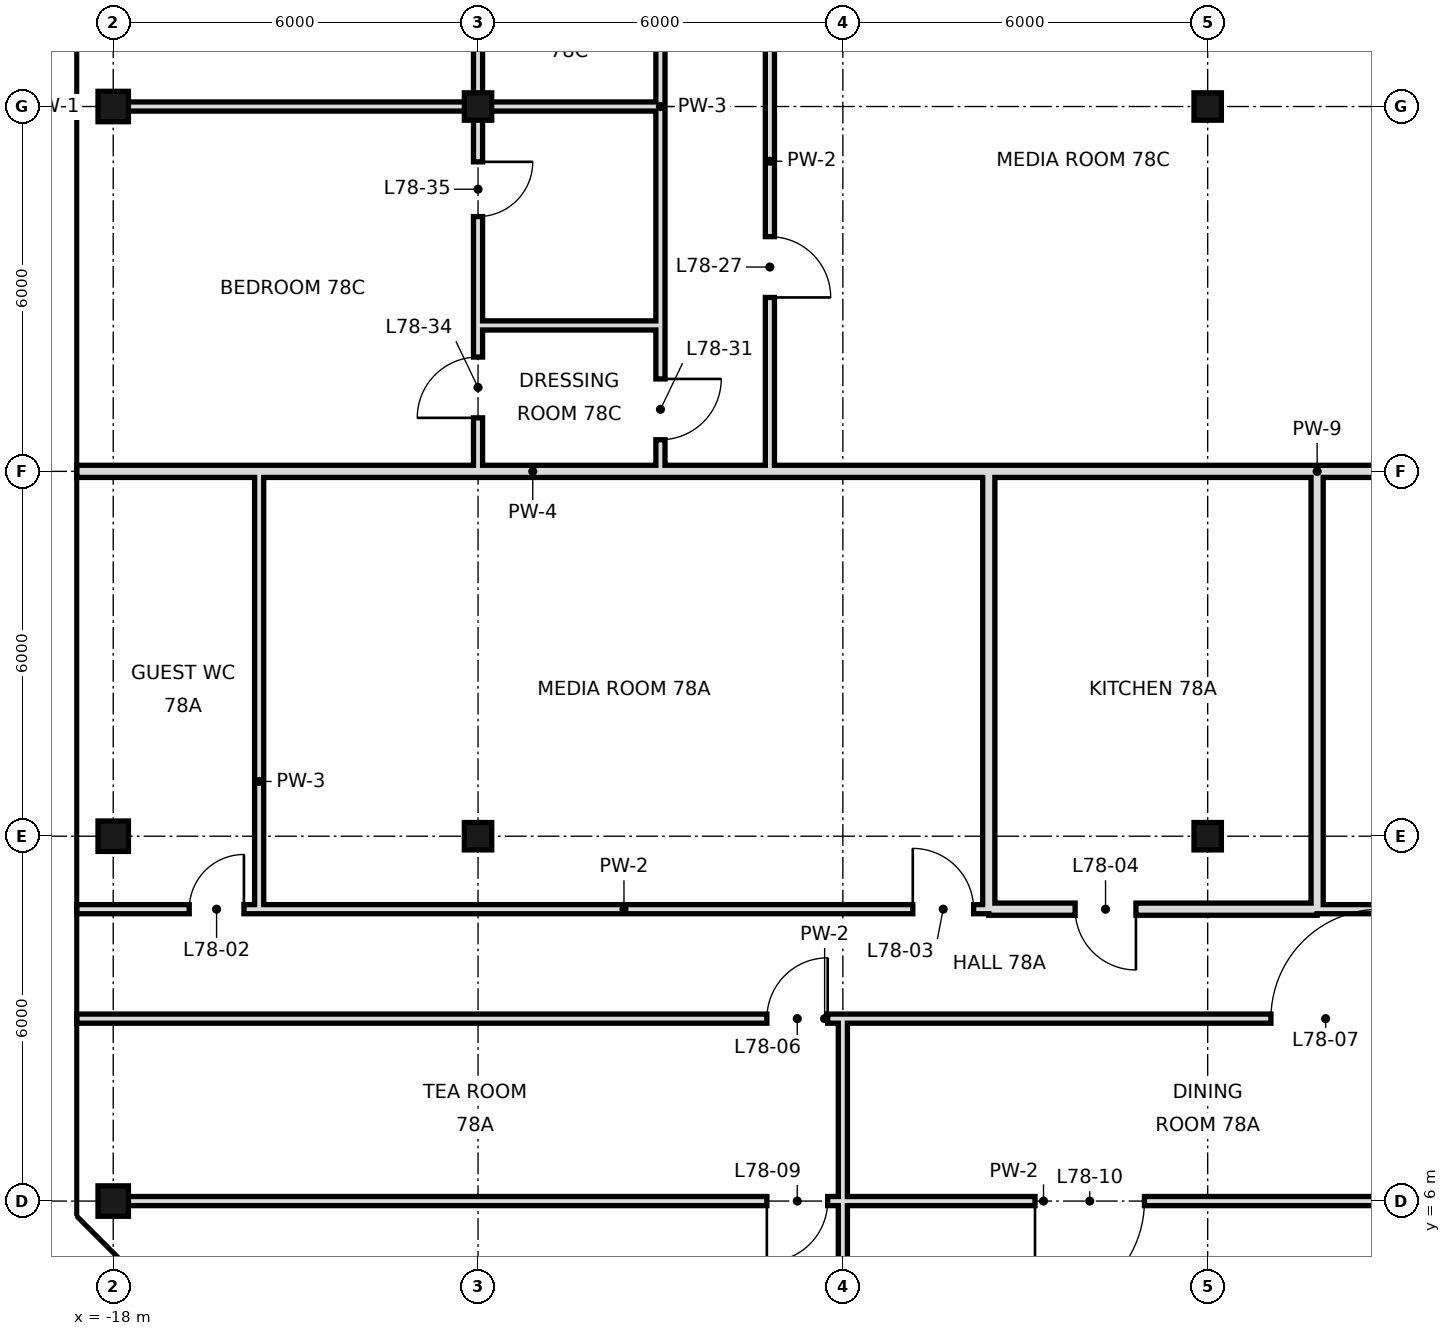
"""IFC4 building model, lengths in metres.
Left out: names, types, materials, properties, quantities, classifications, styles, units other than length and angle.
Written with IfcOpenShell. Run it as: python <this file> out.ifc"""

import sys

from ifc_helpers import new_model, si_unit, direction, frame, frame_2d, origin, origin_2d, place, context, subcontext, project, spatial, rectangle, hollow_rectangle, extrude, element, fill, save


model = new_model("IFC4")
c1 = context("Model", 3, precision=1e-05, world=origin(), true_north=direction((0.0, 1.0)))
c2 = subcontext(c1, "Body", "Model", "MODEL_VIEW")
j1 = project(units=[si_unit("LENGTHUNIT", "METRE"), si_unit("PLANEANGLEUNIT", "RADIAN")], contexts=[c1])
p1 = place(None, origin())
s1 = spatial("IfcSite", under=j1, at=p1, CompositionType="ELEMENT")
p2 = place(p1, origin())
s2 = spatial("IfcBuilding", under=s1, at=p2, CompositionType="ELEMENT")
p3 = place(p2, frame((0.0, 0.0, 326.8)))
s3 = spatial("IfcBuildingStorey", under=s2, at=p3, CompositionType="ELEMENT", Elevation=326.8)
for number, where, z_axis, x_axis in (
    (1, (-18.0, 6.0, 0.0), (0.0, 0.0, 1.0), (1.0, 0.0, 0.0)),
    (2, (-18.0, 12.0, 0.0), (0.0, 0.0, 1.0), (1.0, 0.0, 0.0)),
    (3, (-18.0, 24.0, 0.0), (0.0, 0.0, 1.0), (1.0, 0.0, 0.0)),
):
    element("IfcColumn", number, at=place(p3, frame(where, z_axis=z_axis, x_axis=x_axis)), inside=s3, PredefinedType="COLUMN", context=c2, shape_type="SweptSolid", body=[
        extrude(hollow_rectangle(XDim=0.5, YDim=0.5, WallThickness=0.025, at=origin_2d()), origin(), (0.0, 0.0, 1.0), 4.4),
    ])
for number, where, z_axis, x_axis in (
    (4, (-12.0, 12.0, 0.0), (0.0, 0.0, 1.0), (1.0, 0.0, 0.0)),
    (5, (-12.0, 24.0, 0.0), (0.0, 0.0, 1.0), (1.0, 0.0, 0.0)),
    (6, (0.0, 12.0, 0.0), (0.0, 0.0, 1.0), (1.0, 0.0, 0.0)),
    (7, (0.0, 24.0, 0.0), (0.0, 0.0, 1.0), (1.0, 0.0, 0.0)),
):
    element("IfcColumn", number, at=place(p3, frame(where, z_axis=z_axis, x_axis=x_axis)), inside=s3, PredefinedType="COLUMN", context=c2, shape_type="SweptSolid", body=[
        extrude(hollow_rectangle(XDim=0.45, YDim=0.45, WallThickness=0.022, at=origin_2d()), origin(), (0.0, 0.0, 1.0), 4.4),
    ])
p4 = place(p3, frame((-12.0, 18.0, 0.0), z_axis=(0.0, 0.0, 1.0), x_axis=(0.0, 1.0, 0.0)))
e8 = element("IfcWall", 8, at=p4, inside=s3, PredefinedType="PARTITIONING", context=c2, shape_type="SweptSolid", body=[
    extrude(rectangle(XDim=2.4, YDim=0.15, at=frame_2d((1.2, 0.0))), origin(), (0.0, 0.0, 1.0), 3.4),
])
p5 = place(p4, frame((0.88, 0.0, 0.0)))
e9 = element("IfcOpeningElement", 9, at=p5, cuts=e8, PredefinedType="OPENING", context=c2, shape_type="SweptSolid", body=[
    extrude(rectangle(XDim=1.0, YDim=2.4, at=frame_2d((0.5, 1.2))), frame((0.0, 0.085, 0.0), z_axis=(0.0, -1.0, 0.0), x_axis=(1.0, 0.0, 0.0)), (0.0, 0.0, 1.0), 0.17),
])
p6 = place(p3, frame((-12.0, 24.0, 0.0), z_axis=(0.0, 0.0, 1.0), x_axis=(0.0, 1.0, 0.0)))
e10 = element("IfcWall", 10, at=p6, inside=s3, PredefinedType="PARTITIONING", context=c2, shape_type="SweptSolid", body=[
    extrude(rectangle(XDim=24.0, YDim=0.15, at=frame_2d((12.0, 0.0))), origin(), (0.0, 0.0, 1.0), 3.4),
])
p7 = place(p6, frame((3.4, 0.0, 0.0)))
e11 = element("IfcOpeningElement", 11, at=p7, cuts=e10, PredefinedType="OPENING", context=c2, shape_type="SweptSolid", body=[
    extrude(rectangle(XDim=1.0, YDim=2.4, at=frame_2d((0.5, 1.2))), frame((0.0, 0.085, 0.0), z_axis=(0.0, -1.0, 0.0), x_axis=(1.0, 0.0, 0.0)), (0.0, 0.0, 1.0), 0.17),
])
p8 = place(p6, frame((17.1, 0.0, 0.0)))
e12 = element("IfcOpeningElement", 12, at=p8, cuts=e10, PredefinedType="OPENING", context=c2, shape_type="SweptSolid", body=[
    extrude(rectangle(XDim=1.8, YDim=2.4, at=frame_2d((0.9, 1.2))), frame((0.0, 0.085, 0.0), z_axis=(0.0, -1.0, 0.0), x_axis=(1.0, 0.0, 0.0)), (0.0, 0.0, 1.0), 0.17),
])
p9 = place(p3, frame((-12.0, 20.4, 0.0), z_axis=(0.0, 0.0, 1.0), x_axis=(0.0, 1.0, 0.0)))
e13 = element("IfcWall", 13, at=p9, inside=s3, PredefinedType="PARTITIONING", context=c2, shape_type="SweptSolid", body=[
    extrude(rectangle(XDim=3.6, YDim=0.15, at=frame_2d((1.8, 0.0))), origin(), (0.0, 0.0, 1.0), 3.4),
])
p10 = place(p9, frame((1.79, 0.0, 0.0)))
e14 = element("IfcOpeningElement", 14, at=p10, cuts=e13, PredefinedType="OPENING", context=c2, shape_type="SweptSolid", body=[
    extrude(rectangle(XDim=0.9, YDim=2.4, at=frame_2d((0.45, 1.2))), frame((0.0, 0.085, 0.0), z_axis=(0.0, -1.0, 0.0), x_axis=(1.0, 0.0, 0.0)), (0.0, 0.0, 1.0), 0.17),
])
p11 = place(p3, frame((-15.6, 10.8, 0.0), z_axis=(0.0, 0.0, 1.0), x_axis=(0.0, 1.0, 0.0)))
e15 = element("IfcWall", 15, at=p11, inside=s3, PredefinedType="PARTITIONING", context=c2, shape_type="SweptSolid", body=[
    extrude(rectangle(XDim=7.2, YDim=0.15, at=frame_2d((3.6, 0.0))), origin(), (0.0, 0.0, 1.0), 4.1),
])
p12 = place(p3, frame((-3.6, 10.8, 0.0), z_axis=(0.0, 0.0, 1.0), x_axis=(0.0, 1.0, 0.0)))
e16 = element("IfcWall", 16, at=p12, inside=s3, PredefinedType="SOLIDWALL", context=c2, shape_type="SweptSolid", body=[
    extrude(rectangle(XDim=7.2, YDim=0.2, at=frame_2d((3.6, 0.0))), origin(), (0.0, 0.0, 1.0), 3.4),
])
p13 = place(p3, frame((-6.0, -0.6, 0.0), z_axis=(0.0, 0.0, 1.0), x_axis=(0.0, 1.0, 0.0)))
e17 = element("IfcWall", 17, at=p13, inside=s3, PredefinedType="PARTITIONING", context=c2, shape_type="SweptSolid", body=[
    extrude(rectangle(XDim=9.6, YDim=0.15, at=frame_2d((4.8, 0.0))), origin(), (0.0, 0.0, 1.0), 4.1),
])
p14 = place(p3, frame((-7.2, 18.0, 0.0), z_axis=(0.0, 0.0, 1.0), x_axis=(0.0, 1.0, 0.0)))
e18 = element("IfcWall", 18, at=p14, inside=s3, PredefinedType="PARTITIONING", context=c2, shape_type="SweptSolid", body=[
    extrude(rectangle(XDim=10.2, YDim=0.15, at=frame_2d((5.1, 0.0))), origin(), (0.0, 0.0, 1.0), 4.1),
])
p15 = place(p14, frame((2.86, 0.0, 0.0)))
e19 = element("IfcOpeningElement", 19, at=p15, cuts=e18, PredefinedType="OPENING", context=c2, shape_type="SweptSolid", body=[
    extrude(rectangle(XDim=1.0, YDim=2.4, at=frame_2d((0.5, 1.2))), frame((0.0, 0.085, 0.0), z_axis=(0.0, -1.0, 0.0), x_axis=(1.0, 0.0, 0.0)), (0.0, 0.0, 1.0), 0.17),
])
p16 = place(p3, frame((-9.0, 18.0, 0.0), z_axis=(0.0, 0.0, 1.0), x_axis=(0.0, 1.0, 0.0)))
e20 = element("IfcWall", 20, at=p16, inside=s3, PredefinedType="PARTITIONING", context=c2, shape_type="SweptSolid", body=[
    extrude(rectangle(XDim=2.4, YDim=0.15, at=frame_2d((1.2, 0.0))), origin(), (0.0, 0.0, 1.0), 4.1),
])
p17 = place(p16, frame((0.52, 0.0, 0.0)))
e21 = element("IfcOpeningElement", 21, at=p17, cuts=e20, PredefinedType="OPENING", context=c2, shape_type="SweptSolid", body=[
    extrude(rectangle(XDim=1.0, YDim=2.4, at=frame_2d((0.5, 1.2))), frame((0.0, 0.085, 0.0), z_axis=(0.0, -1.0, 0.0), x_axis=(1.0, 0.0, 0.0)), (0.0, 0.0, 1.0), 0.17),
])
p18 = place(p3, frame((-9.0, 24.0, 0.0), z_axis=(0.0, 0.0, 1.0), x_axis=(0.0, 1.0, 0.0)))
e22 = element("IfcWall", 22, at=p18, inside=s3, PredefinedType="PARTITIONING", context=c2, shape_type="SweptSolid", body=[
    extrude(rectangle(XDim=24.6, YDim=0.15, at=frame_2d((12.3, 0.0))), origin(), (0.0, 0.0, 1.0), 4.1),
])
p19 = place(p18, frame((3.4, 0.0, 0.0)))
e23 = element("IfcOpeningElement", 23, at=p19, cuts=e22, PredefinedType="OPENING", context=c2, shape_type="SweptSolid", body=[
    extrude(rectangle(XDim=1.0, YDim=2.4, at=frame_2d((0.5, 1.2))), frame((0.0, 0.085, 0.0), z_axis=(0.0, -1.0, 0.0), x_axis=(1.0, 0.0, 0.0)), (0.0, 0.0, 1.0), 0.17),
])
p20 = place(p18, frame((17.1, 0.0, 0.0)))
e24 = element("IfcOpeningElement", 24, at=p20, cuts=e22, PredefinedType="OPENING", context=c2, shape_type="SweptSolid", body=[
    extrude(rectangle(XDim=1.8, YDim=2.4, at=frame_2d((0.9, 1.2))), frame((0.0, 0.085, 0.0), z_axis=(0.0, -1.0, 0.0), x_axis=(1.0, 0.0, 0.0)), (0.0, 0.0, 1.0), 0.17),
])
p21 = place(p3, frame((-9.0, 20.4, 0.0), z_axis=(0.0, 0.0, 1.0), x_axis=(0.0, 1.0, 0.0)))
e25 = element("IfcWall", 25, at=p21, inside=s3, PredefinedType="PARTITIONING", context=c2, shape_type="SweptSolid", body=[
    extrude(rectangle(XDim=3.6, YDim=0.15, at=frame_2d((1.8, 0.0))), origin(), (0.0, 0.0, 1.0), 4.1),
])
p22 = place(p3, frame((1.8, 10.8, 0.0), z_axis=(0.0, 0.0, 1.0), x_axis=(0.0, 1.0, 0.0)))
e26 = element("IfcWall", 26, at=p22, inside=s3, PredefinedType="SOLIDWALL", context=c2, shape_type="SweptSolid", body=[
    extrude(rectangle(XDim=7.2, YDim=0.2, at=frame_2d((3.6, 0.0))), origin(), (0.0, 0.0, 1.0), 4.1),
])
p23 = place(p3, frame((-3.6, 10.8, 0.0), z_axis=(0.0, 0.0, 1.0), x_axis=(1.0, 0.0, 0.0)))
e27 = element("IfcWall", 27, at=p23, inside=s3, PredefinedType="SOLIDWALL", context=c2, shape_type="SweptSolid", body=[
    extrude(rectangle(XDim=5.4, YDim=0.2, at=frame_2d((2.7, 0.0))), origin(), (0.0, 0.0, 1.0), 3.4),
])
p24 = place(p23, frame((1.42, 0.0, 0.0)))
e28 = element("IfcOpeningElement", 28, at=p24, cuts=e27, PredefinedType="OPENING", context=c2, shape_type="SweptSolid", body=[
    extrude(rectangle(XDim=1.0, YDim=2.4, at=frame_2d((0.5, 1.2))), frame((0.0, 0.11, 0.0), z_axis=(0.0, -1.0, 0.0), x_axis=(1.0, 0.0, 0.0)), (0.0, 0.0, 1.0), 0.22),
])
p25 = place(p3, frame((-15.6, 10.8, 0.0), z_axis=(0.0, 0.0, 1.0), x_axis=(1.0, 0.0, 0.0)))
e29 = element("IfcWall", 29, at=p25, inside=s3, PredefinedType="PARTITIONING", context=c2, shape_type="SweptSolid", body=[
    extrude(rectangle(XDim=12.0, YDim=0.15, at=frame_2d((6.0, 0.0))), origin(), (0.0, 0.0, 1.0), 4.1),
])
p26 = place(p25, frame((10.75, 0.0, 0.0)))
e30 = element("IfcOpeningElement", 30, at=p26, cuts=e29, PredefinedType="OPENING", context=c2, shape_type="SweptSolid", body=[
    extrude(rectangle(XDim=1.0, YDim=2.4, at=frame_2d((0.5, 1.2))), frame((0.0, 0.085, 0.0), z_axis=(0.0, -1.0, 0.0), x_axis=(1.0, 0.0, 0.0)), (0.0, 0.0, 1.0), 0.17),
])
p27 = place(p3, frame((1.8, 10.8, 0.0), z_axis=(0.0, 0.0, 1.0), x_axis=(1.0, 0.0, 0.0)))
e31 = element("IfcWall", 31, at=p27, inside=s3, PredefinedType="PARTITIONING", context=c2, shape_type="SweptSolid", body=[
    extrude(rectangle(XDim=10.2, YDim=0.15, at=frame_2d((5.1, 0.0))), origin(), (0.0, 0.0, 1.0), 4.1),
])
p28 = place(p27, frame((6.64, 0.0, 0.0)))
e32 = element("IfcOpeningElement", 32, at=p28, cuts=e31, PredefinedType="OPENING", context=c2, shape_type="SweptSolid", body=[
    extrude(rectangle(XDim=1.0, YDim=2.4, at=frame_2d((0.5, 1.2))), frame((0.0, 0.085, 0.0), z_axis=(0.0, -1.0, 0.0), x_axis=(1.0, 0.0, 0.0)), (0.0, 0.0, 1.0), 0.17),
])
p29 = place(p27, frame((2.2, 0.0, 0.0)))
e33 = element("IfcOpeningElement", 33, at=p29, cuts=e31, PredefinedType="OPENING", context=c2, shape_type="SweptSolid", body=[
    extrude(rectangle(XDim=1.0, YDim=2.4, at=frame_2d((0.5, 1.2))), frame((0.0, 0.085, 0.0), z_axis=(0.0, -1.0, 0.0), x_axis=(1.0, 0.0, 0.0)), (0.0, 0.0, 1.0), 0.17),
])
p30 = place(p3, frame((-18.6, 10.8, 0.0), z_axis=(0.0, 0.0, 1.0), x_axis=(1.0, 0.0, 0.0)))
e34 = element("IfcWall", 34, at=p30, inside=s3, PredefinedType="PARTITIONING", context=c2, shape_type="SweptSolid", body=[
    extrude(rectangle(XDim=3.0, YDim=0.15, at=frame_2d((1.5, 0.0))), origin(), (0.0, 0.0, 1.0), 4.1),
])
p31 = place(p30, frame((1.85, 0.0, 0.0)))
e35 = element("IfcOpeningElement", 35, at=p31, cuts=e34, PredefinedType="OPENING", context=c2, shape_type="SweptSolid", body=[
    extrude(rectangle(XDim=0.9, YDim=2.4, at=frame_2d((0.45, 1.2))), frame((0.0, 0.085, 0.0), z_axis=(0.0, -1.0, 0.0), x_axis=(1.0, 0.0, 0.0)), (0.0, 0.0, 1.0), 0.17),
])
p32 = place(p3, frame((-3.6, 18.0, 0.0), z_axis=(0.0, 0.0, 1.0), x_axis=(1.0, 0.0, 0.0)))
e36 = element("IfcWall", 36, at=p32, inside=s3, PredefinedType="SOLIDWALL", context=c2, shape_type="SweptSolid", body=[
    extrude(rectangle(XDim=5.4, YDim=0.2, at=frame_2d((2.7, 0.0))), origin(), (0.0, 0.0, 1.0), 3.4),
])
p33 = place(p3, frame((-18.6, 18.0, 0.0), z_axis=(0.0, 0.0, 1.0), x_axis=(1.0, 0.0, 0.0)))
e37 = element("IfcWall", 37, at=p33, inside=s3, PredefinedType="SOLIDWALL", context=c2, shape_type="SweptSolid", body=[
    extrude(rectangle(XDim=15.0, YDim=0.2, at=frame_2d((7.5, 0.0))), origin(), (0.0, 0.0, 1.0), 3.4),
])
p34 = place(p3, frame((1.8, 18.0, 0.0), z_axis=(0.0, 0.0, 1.0), x_axis=(1.0, 0.0, 0.0)))
e38 = element("IfcWall", 38, at=p34, inside=s3, PredefinedType="SOLIDWALL", context=c2, shape_type="SweptSolid", body=[
    extrude(rectangle(XDim=1.3, YDim=0.2, at=frame_2d((0.65, 0.0))), origin(), (0.0, 0.0, 1.0), 3.65),
])
p35 = place(p3, frame((-12.0, 20.4, 0.0), z_axis=(0.0, 0.0, 1.0), x_axis=(1.0, 0.0, 0.0)))
e39 = element("IfcWall", 39, at=p35, inside=s3, PredefinedType="PARTITIONING", context=c2, shape_type="SweptSolid", body=[
    extrude(rectangle(XDim=3.0, YDim=0.15, at=frame_2d((1.5, 0.0))), origin(), (0.0, 0.0, 1.0), 4.1),
])
p36 = place(p3, frame((-18.0, 24.0, 0.0), z_axis=(0.0, 0.0, 1.0), x_axis=(1.0, 0.0, 0.0)))
e40 = element("IfcWall", 40, at=p36, inside=s3, PredefinedType="PARTITIONING", context=c2, shape_type="SweptSolid", body=[
    extrude(rectangle(XDim=6.0, YDim=0.15, at=frame_2d((3.0, 0.0))), origin(), (0.0, 0.0, 1.0), 3.65),
])
p37 = place(p3, frame((-12.0, 24.0, 0.0), z_axis=(0.0, 0.0, 1.0), x_axis=(1.0, 0.0, 0.0)))
e41 = element("IfcWall", 41, at=p37, inside=s3, PredefinedType="PARTITIONING", context=c2, shape_type="SweptSolid", body=[
    extrude(rectangle(XDim=3.0, YDim=0.15, at=frame_2d((1.5, 0.0))), origin(), (0.0, 0.0, 1.0), 3.4),
])
p38 = place(p3, frame((-18.0, 6.0, 0.0), z_axis=(0.0, 0.0, 1.0), x_axis=(1.0, 0.0, 0.0)))
e42 = element("IfcWall", 42, at=p38, inside=s3, PredefinedType="PARTITIONING", context=c2, shape_type="SweptSolid", body=[
    extrude(rectangle(XDim=24.0, YDim=0.15, at=frame_2d((12.0, 0.0))), origin(), (0.0, 0.0, 1.0), 3.4),
])
p39 = place(p38, frame((10.75, 0.0, 0.0)))
e43 = element("IfcOpeningElement", 43, at=p39, cuts=e42, PredefinedType="OPENING", context=c2, shape_type="SweptSolid", body=[
    extrude(rectangle(XDim=1.0, YDim=2.4, at=frame_2d((0.5, 1.2))), frame((0.0, 0.085, 0.0), z_axis=(0.0, -1.0, 0.0), x_axis=(1.0, 0.0, 0.0)), (0.0, 0.0, 1.0), 0.17),
])
p40 = place(p38, frame((15.16, 0.0, 0.0)))
e44 = element("IfcOpeningElement", 44, at=p40, cuts=e42, PredefinedType="OPENING", context=c2, shape_type="SweptSolid", body=[
    extrude(rectangle(XDim=1.8, YDim=2.4, at=frame_2d((0.9, 1.2))), frame((0.0, 0.085, 0.0), z_axis=(0.0, -1.0, 0.0), x_axis=(1.0, 0.0, 0.0)), (0.0, 0.0, 1.0), 0.17),
])
p41 = place(p3, frame((-18.6, 9.0, 0.0), z_axis=(0.0, 0.0, 1.0), x_axis=(1.0, 0.0, 0.0)))
e45 = element("IfcWall", 45, at=p41, inside=s3, PredefinedType="PARTITIONING", context=c2, shape_type="SweptSolid", body=[
    extrude(rectangle(XDim=24.6, YDim=0.15, at=frame_2d((12.3, 0.0))), origin(), (0.0, 0.0, 1.0), 4.1),
])
p42 = place(p41, frame((11.35, 0.0, 0.0)))
e46 = element("IfcOpeningElement", 46, at=p42, cuts=e45, PredefinedType="OPENING", context=c2, shape_type="SweptSolid", body=[
    extrude(rectangle(XDim=1.0, YDim=2.4, at=frame_2d((0.5, 1.2))), frame((0.0, 0.085, 0.0), z_axis=(0.0, -1.0, 0.0), x_axis=(1.0, 0.0, 0.0)), (0.0, 0.0, 1.0), 0.17),
])
p43 = place(p41, frame((19.64, 0.0, 0.0)))
e47 = element("IfcOpeningElement", 47, at=p43, cuts=e45, PredefinedType="OPENING", context=c2, shape_type="SweptSolid", body=[
    extrude(rectangle(XDim=1.8, YDim=2.4, at=frame_2d((0.9, 1.2))), frame((0.0, 0.085, 0.0), z_axis=(0.0, -1.0, 0.0), x_axis=(1.0, 0.0, 0.0)), (0.0, 0.0, 1.0), 0.17),
])
p44 = place(p31, frame((0.9, 0.0, 0.0), z_axis=(0.0, 0.0, 1.0), x_axis=(-1.0, 0.0, 0.0)))
e48 = element("IfcDoor", 48, at=p44, inside=s3, OperationType="SINGLE_SWING_LEFT", PredefinedType="DOOR", context=c2, shape_type="SweptSolid", body=[
    extrude(rectangle(XDim=0.9, YDim=2.4, at=frame_2d((0.45, 1.2))), frame((0.0, 0.025, 0.0), z_axis=(0.0, -1.0, 0.0), x_axis=(1.0, 0.0, 0.0)), (0.0, 0.0, 1.0), 0.05),
])
fill(e35, e48)
p45 = place(p26, origin())
e49 = element("IfcDoor", 49, at=p45, inside=s3, OperationType="SINGLE_SWING_LEFT", PredefinedType="DOOR", context=c2, shape_type="SweptSolid", body=[
    extrude(rectangle(XDim=1.0, YDim=2.4, at=frame_2d((0.5, 1.2))), frame((0.0, 0.025, 0.0), z_axis=(0.0, -1.0, 0.0), x_axis=(1.0, 0.0, 0.0)), (0.0, 0.0, 1.0), 0.05),
])
fill(e30, e49)
p46 = place(p24, origin())
e50 = element("IfcDoor", 50, at=p46, inside=s3, OperationType="SINGLE_SWING_RIGHT", PredefinedType="DOOR", context=c2, shape_type="SweptSolid", body=[
    extrude(rectangle(XDim=1.0, YDim=2.4, at=frame_2d((0.5, 1.2))), frame((0.0, 0.025, 0.0), z_axis=(0.0, -1.0, 0.0), x_axis=(1.0, 0.0, 0.0)), (0.0, 0.0, 1.0), 0.05),
])
fill(e28, e50)
p47 = place(p42, frame((1.0, 0.0, 0.0), z_axis=(0.0, 0.0, 1.0), x_axis=(-1.0, 0.0, 0.0)))
e51 = element("IfcDoor", 51, at=p47, inside=s3, OperationType="SINGLE_SWING_LEFT", PredefinedType="DOOR", context=c2, shape_type="SweptSolid", body=[
    extrude(rectangle(XDim=1.0, YDim=2.4, at=frame_2d((0.5, 1.2))), frame((0.0, 0.025, 0.0), z_axis=(0.0, -1.0, 0.0), x_axis=(1.0, 0.0, 0.0)), (0.0, 0.0, 1.0), 0.05),
])
fill(e46, e51)
p48 = place(p43, frame((1.8, 0.0, 0.0), z_axis=(0.0, 0.0, 1.0), x_axis=(-1.0, 0.0, 0.0)))
e52 = element("IfcDoor", 52, at=p48, inside=s3, OperationType="SINGLE_SWING_LEFT", PredefinedType="DOOR", context=c2, shape_type="SweptSolid", body=[
    extrude(rectangle(XDim=1.8, YDim=2.4, at=frame_2d((0.9, 1.2))), frame((0.0, 0.025, 0.0), z_axis=(0.0, -1.0, 0.0), x_axis=(1.0, 0.0, 0.0)), (0.0, 0.0, 1.0), 0.05),
])
fill(e47, e52)
p49 = place(p39, frame((1.0, 0.0, 0.0), z_axis=(0.0, 0.0, 1.0), x_axis=(-1.0, 0.0, 0.0)))
e53 = element("IfcDoor", 53, at=p49, inside=s3, OperationType="SINGLE_SWING_RIGHT", PredefinedType="DOOR", context=c2, shape_type="SweptSolid", body=[
    extrude(rectangle(XDim=1.0, YDim=2.4, at=frame_2d((0.5, 1.2))), frame((0.0, 0.025, 0.0), z_axis=(0.0, -1.0, 0.0), x_axis=(1.0, 0.0, 0.0)), (0.0, 0.0, 1.0), 0.05),
])
fill(e43, e53)
p50 = place(p40, frame((1.8, 0.0, 0.0), z_axis=(0.0, 0.0, 1.0), x_axis=(-1.0, 0.0, 0.0)))
e54 = element("IfcDoor", 54, at=p50, inside=s3, OperationType="SINGLE_SWING_RIGHT", PredefinedType="DOOR", context=c2, shape_type="SweptSolid", body=[
    extrude(rectangle(XDim=1.8, YDim=2.4, at=frame_2d((0.9, 1.2))), frame((0.0, 0.025, 0.0), z_axis=(0.0, -1.0, 0.0), x_axis=(1.0, 0.0, 0.0)), (0.0, 0.0, 1.0), 0.05),
])
fill(e44, e54)
p51 = place(p15, frame((1.0, 0.0, 0.0), z_axis=(0.0, 0.0, 1.0), x_axis=(-1.0, 0.0, 0.0)))
e55 = element("IfcDoor", 55, at=p51, inside=s3, OperationType="SINGLE_SWING_RIGHT", PredefinedType="DOOR", context=c2, shape_type="SweptSolid", body=[
    extrude(rectangle(XDim=1.0, YDim=2.4, at=frame_2d((0.5, 1.2))), frame((0.0, 0.025, 0.0), z_axis=(0.0, -1.0, 0.0), x_axis=(1.0, 0.0, 0.0)), (0.0, 0.0, 1.0), 0.05),
])
fill(e19, e55)
p52 = place(p17, origin())
e56 = element("IfcDoor", 56, at=p52, inside=s3, OperationType="SINGLE_SWING_RIGHT", PredefinedType="DOOR", context=c2, shape_type="SweptSolid", body=[
    extrude(rectangle(XDim=1.0, YDim=2.4, at=frame_2d((0.5, 1.2))), frame((0.0, 0.025, 0.0), z_axis=(0.0, -1.0, 0.0), x_axis=(1.0, 0.0, 0.0)), (0.0, 0.0, 1.0), 0.05),
])
fill(e21, e56)
p53 = place(p5, origin())
e57 = element("IfcDoor", 57, at=p53, inside=s3, OperationType="SINGLE_SWING_LEFT", PredefinedType="DOOR", context=c2, shape_type="SweptSolid", body=[
    extrude(rectangle(XDim=1.0, YDim=2.4, at=frame_2d((0.5, 1.2))), frame((0.0, 0.025, 0.0), z_axis=(0.0, -1.0, 0.0), x_axis=(1.0, 0.0, 0.0)), (0.0, 0.0, 1.0), 0.05),
])
fill(e9, e57)
p54 = place(p10, origin())
e58 = element("IfcDoor", 58, at=p54, inside=s3, OperationType="SINGLE_SWING_RIGHT", PredefinedType="DOOR", context=c2, shape_type="SweptSolid", body=[
    extrude(rectangle(XDim=0.9, YDim=2.4, at=frame_2d((0.45, 1.2))), frame((0.0, 0.025, 0.0), z_axis=(0.0, -1.0, 0.0), x_axis=(1.0, 0.0, 0.0)), (0.0, 0.0, 1.0), 0.05),
])
fill(e14, e58)
save(model, sys.argv[1])
